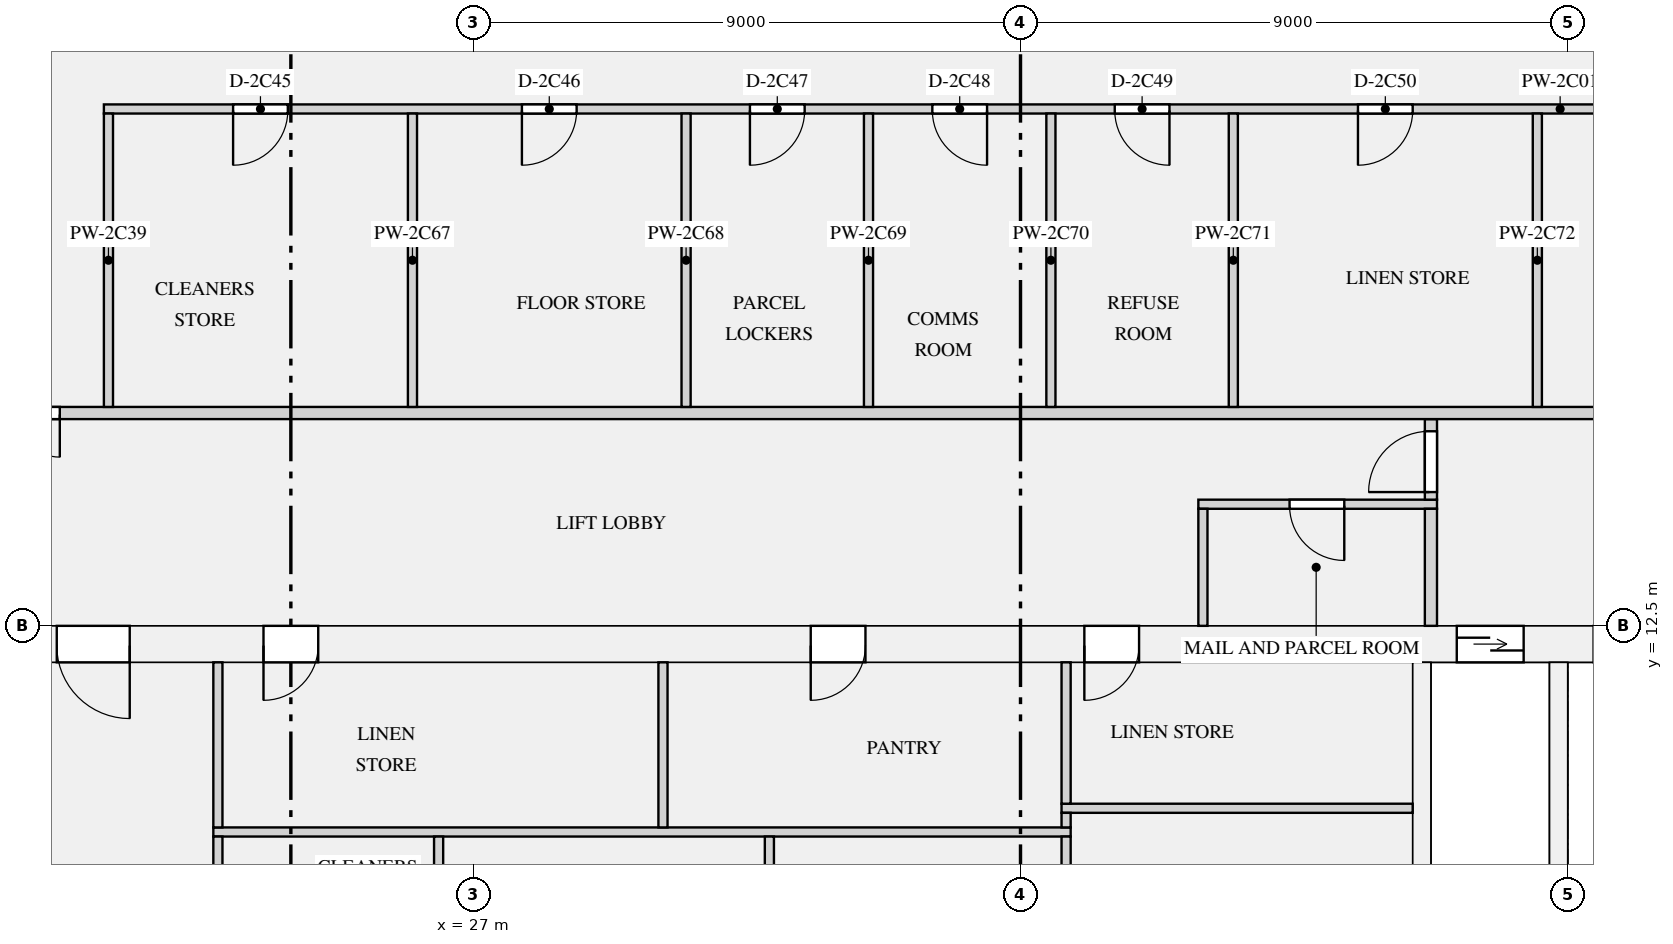
"""IFC4 building model, lengths in metres.
Left out: names, types, materials, properties, quantities, classifications, styles, units other than length and angle.
Written with IfcOpenShell. Run it as: python <this file> out.ifc"""

import sys

from ifc_helpers import new_model, si_unit, direction, frame, frame_2d, origin, place, context, subcontext, project, spatial, rectangle, extrude, element, fill, save


model = new_model("IFC4")
c1 = context("Model", 3, precision=1e-05, world=origin(), true_north=direction((0.0, 1.0)))
c2 = subcontext(c1, "Body", "Model", "MODEL_VIEW")
j1 = project(units=[si_unit("LENGTHUNIT", "METRE"), si_unit("PLANEANGLEUNIT", "RADIAN")], contexts=[c1])
p1 = place(None, origin())
s1 = spatial("IfcSite", under=j1, at=p1, CompositionType="ELEMENT")
p2 = place(p1, origin())
s2 = spatial("IfcBuilding", under=s1, at=p2, CompositionType="ELEMENT")
p3 = place(p2, frame((0.0, 0.0, 102.45)))
s3 = spatial("IfcBuildingStorey", under=s2, at=p3, CompositionType="ELEMENT", Elevation=102.45)
p4 = place(p3, frame((18.8, 12.2, 0.0), z_axis=(0.0, 0.0, 1.0), x_axis=(1.0, 0.0, 0.0)))
e1 = element("IfcWall", 1, at=p4, inside=s3, PredefinedType="SHEAR", context=c2, shape_type="SweptSolid", body=[
    extrude(rectangle(XDim=34.4, YDim=0.6, at=frame_2d((17.2, 0.0))), origin(), (0.0, 0.0, 1.0), 3.15),
])
p5 = place(p4, frame((24.375, 0.0, 0.0)))
e2 = element("IfcOpeningElement", 2, at=p5, cuts=e1, PredefinedType="OPENING", context=c2, shape_type="SweptSolid", body=[
    extrude(rectangle(XDim=1.1, YDim=2.1, at=frame_2d((0.55, 1.05))), frame((0.0, 0.31, 0.0), z_axis=(0.0, -1.0, 0.0), x_axis=(1.0, 0.0, 0.0)), (0.0, 0.0, 1.0), 0.62),
])
p6 = place(p4, frame((26.625, 0.0, 0.0)))
e3 = element("IfcOpeningElement", 3, at=p6, cuts=e1, PredefinedType="OPENING", context=c2, shape_type="SweptSolid", body=[
    extrude(rectangle(XDim=1.1, YDim=2.1, at=frame_2d((0.55, 1.05))), frame((0.0, 0.31, 0.0), z_axis=(0.0, -1.0, 0.0), x_axis=(1.0, 0.0, 0.0)), (0.0, 0.0, 1.0), 0.62),
])
p7 = place(p4, frame((28.875, 0.0, 0.0)))
e4 = element("IfcOpeningElement", 4, at=p7, cuts=e1, PredefinedType="OPENING", context=c2, shape_type="SweptSolid", body=[
    extrude(rectangle(XDim=1.1, YDim=2.1, at=frame_2d((0.55, 1.05))), frame((0.0, 0.31, 0.0), z_axis=(0.0, -1.0, 0.0), x_axis=(1.0, 0.0, 0.0)), (0.0, 0.0, 1.0), 0.62),
])
p8 = place(p4, frame((4.75, 0.0, 0.0)))
e5 = element("IfcOpeningElement", 5, at=p8, cuts=e1, PredefinedType="OPENING", context=c2, shape_type="SweptSolid", body=[
    extrude(rectangle(XDim=0.9, YDim=2.1, at=frame_2d((0.45, 1.05))), frame((0.0, 0.31, 0.0), z_axis=(0.0, -1.0, 0.0), x_axis=(1.0, 0.0, 0.0)), (0.0, 0.0, 1.0), 0.62),
])
p9 = place(p4, frame((13.75, 0.0, 0.0)))
e6 = element("IfcOpeningElement", 6, at=p9, cuts=e1, PredefinedType="OPENING", context=c2, shape_type="SweptSolid", body=[
    extrude(rectangle(XDim=0.9, YDim=2.1, at=frame_2d((0.45, 1.05))), frame((0.0, 0.31, 0.0), z_axis=(0.0, -1.0, 0.0), x_axis=(1.0, 0.0, 0.0)), (0.0, 0.0, 1.0), 0.62),
])
p10 = place(p4, frame((18.25, 0.0, 0.0)))
e7 = element("IfcOpeningElement", 7, at=p10, cuts=e1, PredefinedType="OPENING", context=c2, shape_type="SweptSolid", body=[
    extrude(rectangle(XDim=0.9, YDim=2.1, at=frame_2d((0.45, 1.05))), frame((0.0, 0.31, 0.0), z_axis=(0.0, -1.0, 0.0), x_axis=(1.0, 0.0, 0.0)), (0.0, 0.0, 1.0), 0.62),
])
p11 = place(p4, frame((1.35, 0.0, 0.0)))
e8 = element("IfcOpeningElement", 8, at=p11, cuts=e1, PredefinedType="OPENING", context=c2, shape_type="SweptSolid", body=[
    extrude(rectangle(XDim=1.2, YDim=2.1, at=frame_2d((0.6, 1.05))), frame((0.0, 0.31, 0.0), z_axis=(0.0, -1.0, 0.0), x_axis=(1.0, 0.0, 0.0)), (0.0, 0.0, 1.0), 0.62),
])
p12 = place(p4, frame((31.85, 0.0, 0.0)))
e9 = element("IfcOpeningElement", 9, at=p12, cuts=e1, PredefinedType="OPENING", context=c2, shape_type="SweptSolid", body=[
    extrude(rectangle(XDim=1.2, YDim=2.1, at=frame_2d((0.6, 1.05))), frame((0.0, 0.31, 0.0), z_axis=(0.0, -1.0, 0.0), x_axis=(1.0, 0.0, 0.0)), (0.0, 0.0, 1.0), 0.62),
])
for number, where, z_axis, x_axis in (
    (10, (42.6, 8.25, 0.0), (0.0, 0.0, 1.0), (0.0, 1.0, 0.0)),
    (11, (44.85, 8.25, 0.0), (0.0, 0.0, 1.0), (0.0, 1.0, 0.0)),
):
    element("IfcWall", number, at=place(p3, frame(where, z_axis=z_axis, x_axis=x_axis)), inside=s3, PredefinedType="SHEAR", context=c2, shape_type="SweptSolid", body=[
        extrude(rectangle(XDim=3.65, YDim=0.3, at=frame_2d((1.825, 0.0))), origin(), (0.0, 0.0, 1.0), 3.15),
    ])
p13 = place(p3, frame((22.725, 9.11, 0.0), z_axis=(0.0, 0.0, 1.0), x_axis=(1.0, 0.0, 0.0)))
e12 = element("IfcWall", 12, at=p13, inside=s3, PredefinedType="PARTITIONING", context=c2, shape_type="SweptSolid", body=[
    extrude(rectangle(XDim=14.1, YDim=0.15, at=frame_2d((7.05, 0.0))), origin(), (0.0, 0.0, 1.0), 2.83),
])
p14 = place(p3, frame((36.675, 9.5, 0.0), z_axis=(0.0, 0.0, 1.0), x_axis=(1.0, 0.0, 0.0)))
e13 = element("IfcWall", 13, at=p14, inside=s3, PredefinedType="PARTITIONING", context=c2, shape_type="SweptSolid", body=[
    extrude(rectangle(XDim=5.775, YDim=0.15, at=frame_2d((2.887, 0.0))), origin(), (0.0, 0.0, 1.0), 2.83),
])
p15 = place(p3, frame((38.925, 14.5, 0.0), z_axis=(0.0, 0.0, 1.0), x_axis=(1.0, 0.0, 0.0)))
e14 = element("IfcWall", 14, at=p15, inside=s3, PredefinedType="PARTITIONING", context=c2, shape_type="SweptSolid", body=[
    extrude(rectangle(XDim=3.925, YDim=0.15, at=frame_2d((1.962, 0.0))), origin(), (0.0, 0.0, 1.0), 2.83),
])
p16 = place(p15, frame((1.5, 0.0, 0.0)))
e15 = element("IfcOpeningElement", 15, at=p16, cuts=e14, PredefinedType="OPENING", context=c2, shape_type="SweptSolid", body=[
    extrude(rectangle(XDim=0.9, YDim=2.1, at=frame_2d((0.45, 1.05))), frame((0.0, 0.085, 0.0), z_axis=(0.0, -1.0, 0.0), x_axis=(1.0, 0.0, 0.0)), (0.0, 0.0, 1.0), 0.17),
])
for number, where, z_axis, x_axis in (
    (16, (22.8, 6.725, 0.0), (0.0, 0.0, 1.0), (0.0, 1.0, 0.0)),
    (17, (26.43, 6.725, 0.0), (0.0, 0.0, 1.0), (0.0, 1.0, 0.0)),
    (18, (31.87, 6.725, 0.0), (0.0, 0.0, 1.0), (0.0, 1.0, 0.0)),
    (19, (36.75, 6.725, 0.0), (0.0, 0.0, 1.0), (0.0, 1.0, 0.0)),
):
    element("IfcWall", number, at=place(p3, frame(where, z_axis=z_axis, x_axis=x_axis)), inside=s3, PredefinedType="PARTITIONING", context=c2, shape_type="SweptSolid", body=[
        extrude(rectangle(XDim=2.31, YDim=0.15, at=frame_2d((1.155, 0.0))), origin(), (0.0, 0.0, 1.0), 2.83),
    ])
for number, where, z_axis, x_axis in (
    (20, (22.8, 9.185, 0.0), (0.0, 0.0, 1.0), (0.0, 1.0, 0.0)),
    (21, (30.12, 9.185, 0.0), (0.0, 0.0, 1.0), (0.0, 1.0, 0.0)),
):
    element("IfcWall", number, at=place(p3, frame(where, z_axis=z_axis, x_axis=x_axis)), inside=s3, PredefinedType="PARTITIONING", context=c2, shape_type="SweptSolid", body=[
        extrude(rectangle(XDim=2.715, YDim=0.15, at=frame_2d((1.357, 0.0))), origin(), (0.0, 0.0, 1.0), 2.83),
    ])
p17 = place(p3, frame((36.75, 9.185, 0.0), z_axis=(0.0, 0.0, 1.0), x_axis=(0.0, 1.0, 0.0)))
e22 = element("IfcWall", 22, at=p17, inside=s3, PredefinedType="PARTITIONING", context=c2, shape_type="SweptSolid", body=[
    extrude(rectangle(XDim=0.24, YDim=0.15, at=frame_2d((0.12, 0.0))), origin(), (0.0, 0.0, 1.0), 2.83),
])
p18 = place(p3, frame((36.75, 9.575, 0.0), z_axis=(0.0, 0.0, 1.0), x_axis=(0.0, 1.0, 0.0)))
e23 = element("IfcWall", 23, at=p18, inside=s3, PredefinedType="PARTITIONING", context=c2, shape_type="SweptSolid", body=[
    extrude(rectangle(XDim=2.325, YDim=0.15, at=frame_2d((1.163, 0.0))), origin(), (0.0, 0.0, 1.0), 2.83),
])
p19 = place(p3, frame((39.0, 12.5, 0.0), z_axis=(0.0, 0.0, 1.0), x_axis=(0.0, 1.0, 0.0)))
e24 = element("IfcWall", 24, at=p19, inside=s3, PredefinedType="PARTITIONING", context=c2, shape_type="SweptSolid", body=[
    extrude(rectangle(XDim=1.925, YDim=0.15, at=frame_2d((0.962, 0.0))), origin(), (0.0, 0.0, 1.0), 2.83),
])
p20 = place(p3, frame((42.75, 12.5, 0.0), z_axis=(0.0, 0.0, 1.0), x_axis=(0.0, 1.0, 0.0)))
e25 = element("IfcWall", 25, at=p20, inside=s3, PredefinedType="PARTITIONING", context=c2, shape_type="SweptSolid", body=[
    extrude(rectangle(XDim=1.925, YDim=0.2, at=frame_2d((0.962, 0.0))), origin(), (0.0, 0.0, 1.0), 2.83),
])
p21 = place(p3, frame((42.75, 14.575, 0.0), z_axis=(0.0, 0.0, 1.0), x_axis=(0.0, 1.0, 0.0)))
e26 = element("IfcWall", 26, at=p21, inside=s3, PredefinedType="PARTITIONING", context=c2, shape_type="SweptSolid", body=[
    extrude(rectangle(XDim=1.325, YDim=0.2, at=frame_2d((0.663, 0.0))), origin(), (0.0, 0.0, 1.0), 2.83),
])
p22 = place(p21, frame((0.125, 0.0, 0.0)))
e27 = element("IfcOpeningElement", 27, at=p22, cuts=e26, PredefinedType="OPENING", context=c2, shape_type="SweptSolid", body=[
    extrude(rectangle(XDim=1.0, YDim=2.1, at=frame_2d((0.5, 1.05))), frame((0.0, 0.11, 0.0), z_axis=(0.0, -1.0, 0.0), x_axis=(1.0, 0.0, 0.0)), (0.0, 0.0, 1.0), 0.22),
])
p23 = place(p3, frame((20.925, 21.0, 0.0), z_axis=(0.0, 0.0, 1.0), x_axis=(1.0, 0.0, 0.0)))
e28 = element("IfcWall", 28, at=p23, inside=s3, PredefinedType="PARTITIONING", context=c2, shape_type="SweptSolid", body=[
    extrude(rectangle(XDim=30.15, YDim=0.15, at=frame_2d((15.075, 0.0))), origin(), (0.0, 0.0, 1.0), 2.83),
])
p24 = place(p23, frame((2.125, 0.0, 0.0)))
e29 = element("IfcOpeningElement", 29, at=p24, cuts=e28, PredefinedType="OPENING", context=c2, shape_type="SweptSolid", body=[
    extrude(rectangle(XDim=0.9, YDim=2.1, at=frame_2d((0.45, 1.05))), frame((0.0, 0.085, 0.0), z_axis=(0.0, -1.0, 0.0), x_axis=(1.0, 0.0, 0.0)), (0.0, 0.0, 1.0), 0.17),
])
p25 = place(p23, frame((6.875, 0.0, 0.0)))
e30 = element("IfcOpeningElement", 30, at=p25, cuts=e28, PredefinedType="OPENING", context=c2, shape_type="SweptSolid", body=[
    extrude(rectangle(XDim=0.9, YDim=2.1, at=frame_2d((0.45, 1.05))), frame((0.0, 0.085, 0.0), z_axis=(0.0, -1.0, 0.0), x_axis=(1.0, 0.0, 0.0)), (0.0, 0.0, 1.0), 0.17),
])
p26 = place(p23, frame((10.625, 0.0, 0.0)))
e31 = element("IfcOpeningElement", 31, at=p26, cuts=e28, PredefinedType="OPENING", context=c2, shape_type="SweptSolid", body=[
    extrude(rectangle(XDim=0.9, YDim=2.1, at=frame_2d((0.45, 1.05))), frame((0.0, 0.085, 0.0), z_axis=(0.0, -1.0, 0.0), x_axis=(1.0, 0.0, 0.0)), (0.0, 0.0, 1.0), 0.17),
])
p27 = place(p23, frame((13.625, 0.0, 0.0)))
e32 = element("IfcOpeningElement", 32, at=p27, cuts=e28, PredefinedType="OPENING", context=c2, shape_type="SweptSolid", body=[
    extrude(rectangle(XDim=0.9, YDim=2.1, at=frame_2d((0.45, 1.05))), frame((0.0, 0.085, 0.0), z_axis=(0.0, -1.0, 0.0), x_axis=(1.0, 0.0, 0.0)), (0.0, 0.0, 1.0), 0.17),
])
p28 = place(p23, frame((16.625, 0.0, 0.0)))
e33 = element("IfcOpeningElement", 33, at=p28, cuts=e28, PredefinedType="OPENING", context=c2, shape_type="SweptSolid", body=[
    extrude(rectangle(XDim=0.9, YDim=2.1, at=frame_2d((0.45, 1.05))), frame((0.0, 0.085, 0.0), z_axis=(0.0, -1.0, 0.0), x_axis=(1.0, 0.0, 0.0)), (0.0, 0.0, 1.0), 0.17),
])
p29 = place(p23, frame((20.625, 0.0, 0.0)))
e34 = element("IfcOpeningElement", 34, at=p29, cuts=e28, PredefinedType="OPENING", context=c2, shape_type="SweptSolid", body=[
    extrude(rectangle(XDim=0.9, YDim=2.1, at=frame_2d((0.45, 1.05))), frame((0.0, 0.085, 0.0), z_axis=(0.0, -1.0, 0.0), x_axis=(1.0, 0.0, 0.0)), (0.0, 0.0, 1.0), 0.17),
])
p30 = place(p23, frame((26.375, 0.0, 0.0)))
e35 = element("IfcOpeningElement", 35, at=p30, cuts=e28, PredefinedType="OPENING", context=c2, shape_type="SweptSolid", body=[
    extrude(rectangle(XDim=0.9, YDim=2.1, at=frame_2d((0.45, 1.05))), frame((0.0, 0.085, 0.0), z_axis=(0.0, -1.0, 0.0), x_axis=(1.0, 0.0, 0.0)), (0.0, 0.0, 1.0), 0.17),
])
p31 = place(p3, frame((17.9, 16.0, 0.0), z_axis=(0.0, 0.0, 1.0), x_axis=(1.0, 0.0, 0.0)))
e36 = element("IfcWall", 36, at=p31, inside=s3, PredefinedType="PARTITIONING", context=c2, shape_type="SweptSolid", body=[
    extrude(rectangle(XDim=36.2, YDim=0.2, at=frame_2d((18.1, 0.0))), origin(), (0.0, 0.0, 1.0), 2.83),
])
p32 = place(p31, frame((0.9, 0.0, 0.0)))
e37 = element("IfcOpeningElement", 37, at=p32, cuts=e36, PredefinedType="OPENING", context=c2, shape_type="SweptSolid", body=[
    extrude(rectangle(XDim=1.4, YDim=2.1, at=frame_2d((0.7, 1.05))), frame((0.0, 0.11, 0.0), z_axis=(0.0, -1.0, 0.0), x_axis=(1.0, 0.0, 0.0)), (0.0, 0.0, 1.0), 0.22),
])
p33 = place(p31, frame((33.9, 0.0, 0.0)))
e38 = element("IfcOpeningElement", 38, at=p33, cuts=e36, PredefinedType="OPENING", context=c2, shape_type="SweptSolid", body=[
    extrude(rectangle(XDim=1.4, YDim=2.1, at=frame_2d((0.7, 1.05))), frame((0.0, 0.11, 0.0), z_axis=(0.0, -1.0, 0.0), x_axis=(1.0, 0.0, 0.0)), (0.0, 0.0, 1.0), 0.22),
])
for number, where, z_axis, x_axis in (
    (39, (21.0, 16.1, 0.0), (0.0, 0.0, 1.0), (0.0, 1.0, 0.0)),
    (40, (26.0, 16.1, 0.0), (0.0, 0.0, 1.0), (0.0, 1.0, 0.0)),
    (41, (30.5, 16.1, 0.0), (0.0, 0.0, 1.0), (0.0, 1.0, 0.0)),
    (42, (33.5, 16.1, 0.0), (0.0, 0.0, 1.0), (0.0, 1.0, 0.0)),
    (43, (36.5, 16.1, 0.0), (0.0, 0.0, 1.0), (0.0, 1.0, 0.0)),
    (44, (39.5, 16.1, 0.0), (0.0, 0.0, 1.0), (0.0, 1.0, 0.0)),
    (45, (44.5, 16.1, 0.0), (0.0, 0.0, 1.0), (0.0, 1.0, 0.0)),
):
    element("IfcWall", number, at=place(p3, frame(where, z_axis=z_axis, x_axis=x_axis)), inside=s3, PredefinedType="PARTITIONING", context=c2, shape_type="SweptSolid", body=[
        extrude(rectangle(XDim=4.825, YDim=0.15, at=frame_2d((2.413, 0.0))), origin(), (0.0, 0.0, 1.0), 2.83),
    ])
p34 = place(p5, origin())
e46 = element("IfcDoor", 46, at=p34, inside=s3, OperationType="DOUBLE_DOOR_SLIDING", PredefinedType="DOOR", context=c2, shape_type="SweptSolid", body=[
    extrude(rectangle(XDim=1.1, YDim=2.1, at=frame_2d((0.55, 1.05))), frame((0.0, 0.025, 0.0), z_axis=(0.0, -1.0, 0.0), x_axis=(1.0, 0.0, 0.0)), (0.0, 0.0, 1.0), 0.05),
])
fill(e2, e46)
p35 = place(p16, frame((0.9, 0.0, 0.0), z_axis=(0.0, 0.0, 1.0), x_axis=(-1.0, 0.0, 0.0)))
e47 = element("IfcDoor", 47, at=p35, inside=s3, OperationType="SINGLE_SWING_LEFT", PredefinedType="DOOR", context=c2, shape_type="SweptSolid", body=[
    extrude(rectangle(XDim=0.9, YDim=2.1, at=frame_2d((0.45, 1.05))), frame((0.0, 0.025, 0.0), z_axis=(0.0, -1.0, 0.0), x_axis=(1.0, 0.0, 0.0)), (0.0, 0.0, 1.0), 0.05),
])
fill(e15, e47)
p36 = place(p8, frame((0.9, 0.0, 0.0), z_axis=(0.0, 0.0, 1.0), x_axis=(-1.0, 0.0, 0.0)))
e48 = element("IfcDoor", 48, at=p36, inside=s3, OperationType="SINGLE_SWING_RIGHT", PredefinedType="DOOR", context=c2, shape_type="SweptSolid", body=[
    extrude(rectangle(XDim=0.9, YDim=2.1, at=frame_2d((0.45, 1.05))), frame((0.0, 0.025, 0.0), z_axis=(0.0, -1.0, 0.0), x_axis=(1.0, 0.0, 0.0)), (0.0, 0.0, 1.0), 0.05),
])
fill(e5, e48)
p37 = place(p9, frame((0.9, 0.0, 0.0), z_axis=(0.0, 0.0, 1.0), x_axis=(-1.0, 0.0, 0.0)))
e49 = element("IfcDoor", 49, at=p37, inside=s3, OperationType="SINGLE_SWING_RIGHT", PredefinedType="DOOR", context=c2, shape_type="SweptSolid", body=[
    extrude(rectangle(XDim=0.9, YDim=2.1, at=frame_2d((0.45, 1.05))), frame((0.0, 0.025, 0.0), z_axis=(0.0, -1.0, 0.0), x_axis=(1.0, 0.0, 0.0)), (0.0, 0.0, 1.0), 0.05),
])
fill(e6, e49)
p38 = place(p10, frame((0.9, 0.0, 0.0), z_axis=(0.0, 0.0, 1.0), x_axis=(-1.0, 0.0, 0.0)))
e50 = element("IfcDoor", 50, at=p38, inside=s3, OperationType="SINGLE_SWING_RIGHT", PredefinedType="DOOR", context=c2, shape_type="SweptSolid", body=[
    extrude(rectangle(XDim=0.9, YDim=2.1, at=frame_2d((0.45, 1.05))), frame((0.0, 0.025, 0.0), z_axis=(0.0, -1.0, 0.0), x_axis=(1.0, 0.0, 0.0)), (0.0, 0.0, 1.0), 0.05),
])
fill(e7, e50)
p39 = place(p11, frame((1.2, 0.0, 0.0), z_axis=(0.0, 0.0, 1.0), x_axis=(-1.0, 0.0, 0.0)))
e51 = element("IfcDoor", 51, at=p39, inside=s3, OperationType="SINGLE_SWING_LEFT", PredefinedType="DOOR", context=c2, shape_type="SweptSolid", body=[
    extrude(rectangle(XDim=1.2, YDim=2.1, at=frame_2d((0.6, 1.05))), frame((0.0, 0.025, 0.0), z_axis=(0.0, -1.0, 0.0), x_axis=(1.0, 0.0, 0.0)), (0.0, 0.0, 1.0), 0.05),
])
fill(e8, e51)
p40 = place(p22, origin())
e52 = element("IfcDoor", 52, at=p40, inside=s3, OperationType="SINGLE_SWING_LEFT", PredefinedType="DOOR", context=c2, shape_type="SweptSolid", body=[
    extrude(rectangle(XDim=1.0, YDim=2.1, at=frame_2d((0.5, 1.05))), frame((0.0, 0.025, 0.0), z_axis=(0.0, -1.0, 0.0), x_axis=(1.0, 0.0, 0.0)), (0.0, 0.0, 1.0), 0.05),
])
fill(e27, e52)
p41 = place(p32, frame((1.4, 0.0, 0.0), z_axis=(0.0, 0.0, 1.0), x_axis=(-1.0, 0.0, 0.0)))
e53 = element("IfcDoor", 53, at=p41, inside=s3, OperationType="DOUBLE_DOOR_SINGLE_SWING", PredefinedType="DOOR", context=c2, shape_type="SweptSolid", body=[
    extrude(rectangle(XDim=1.4, YDim=2.1, at=frame_2d((0.7, 1.05))), frame((0.0, 0.025, 0.0), z_axis=(0.0, -1.0, 0.0), x_axis=(1.0, 0.0, 0.0)), (0.0, 0.0, 1.0), 0.05),
])
fill(e37, e53)
p42 = place(p24, frame((0.9, 0.0, 0.0), z_axis=(0.0, 0.0, 1.0), x_axis=(-1.0, 0.0, 0.0)))
e54 = element("IfcDoor", 54, at=p42, inside=s3, OperationType="SINGLE_SWING_RIGHT", PredefinedType="DOOR", context=c2, shape_type="SweptSolid", body=[
    extrude(rectangle(XDim=0.9, YDim=2.1, at=frame_2d((0.45, 1.05))), frame((0.0, 0.025, 0.0), z_axis=(0.0, -1.0, 0.0), x_axis=(1.0, 0.0, 0.0)), (0.0, 0.0, 1.0), 0.05),
])
fill(e29, e54)
p43 = place(p25, frame((0.9, 0.0, 0.0), z_axis=(0.0, 0.0, 1.0), x_axis=(-1.0, 0.0, 0.0)))
e55 = element("IfcDoor", 55, at=p43, inside=s3, OperationType="SINGLE_SWING_RIGHT", PredefinedType="DOOR", context=c2, shape_type="SweptSolid", body=[
    extrude(rectangle(XDim=0.9, YDim=2.1, at=frame_2d((0.45, 1.05))), frame((0.0, 0.025, 0.0), z_axis=(0.0, -1.0, 0.0), x_axis=(1.0, 0.0, 0.0)), (0.0, 0.0, 1.0), 0.05),
])
fill(e30, e55)
p44 = place(p26, frame((0.9, 0.0, 0.0), z_axis=(0.0, 0.0, 1.0), x_axis=(-1.0, 0.0, 0.0)))
e56 = element("IfcDoor", 56, at=p44, inside=s3, OperationType="SINGLE_SWING_RIGHT", PredefinedType="DOOR", context=c2, shape_type="SweptSolid", body=[
    extrude(rectangle(XDim=0.9, YDim=2.1, at=frame_2d((0.45, 1.05))), frame((0.0, 0.025, 0.0), z_axis=(0.0, -1.0, 0.0), x_axis=(1.0, 0.0, 0.0)), (0.0, 0.0, 1.0), 0.05),
])
fill(e31, e56)
p45 = place(p27, frame((0.9, 0.0, 0.0), z_axis=(0.0, 0.0, 1.0), x_axis=(-1.0, 0.0, 0.0)))
e57 = element("IfcDoor", 57, at=p45, inside=s3, OperationType="SINGLE_SWING_LEFT", PredefinedType="DOOR", context=c2, shape_type="SweptSolid", body=[
    extrude(rectangle(XDim=0.9, YDim=2.1, at=frame_2d((0.45, 1.05))), frame((0.0, 0.025, 0.0), z_axis=(0.0, -1.0, 0.0), x_axis=(1.0, 0.0, 0.0)), (0.0, 0.0, 1.0), 0.05),
])
fill(e32, e57)
p46 = place(p28, frame((0.9, 0.0, 0.0), z_axis=(0.0, 0.0, 1.0), x_axis=(-1.0, 0.0, 0.0)))
e58 = element("IfcDoor", 58, at=p46, inside=s3, OperationType="SINGLE_SWING_LEFT", PredefinedType="DOOR", context=c2, shape_type="SweptSolid", body=[
    extrude(rectangle(XDim=0.9, YDim=2.1, at=frame_2d((0.45, 1.05))), frame((0.0, 0.025, 0.0), z_axis=(0.0, -1.0, 0.0), x_axis=(1.0, 0.0, 0.0)), (0.0, 0.0, 1.0), 0.05),
])
fill(e33, e58)
p47 = place(p29, frame((0.9, 0.0, 0.0), z_axis=(0.0, 0.0, 1.0), x_axis=(-1.0, 0.0, 0.0)))
e59 = element("IfcDoor", 59, at=p47, inside=s3, OperationType="SINGLE_SWING_RIGHT", PredefinedType="DOOR", context=c2, shape_type="SweptSolid", body=[
    extrude(rectangle(XDim=0.9, YDim=2.1, at=frame_2d((0.45, 1.05))), frame((0.0, 0.025, 0.0), z_axis=(0.0, -1.0, 0.0), x_axis=(1.0, 0.0, 0.0)), (0.0, 0.0, 1.0), 0.05),
])
fill(e34, e59)
save(model, sys.argv[1])
